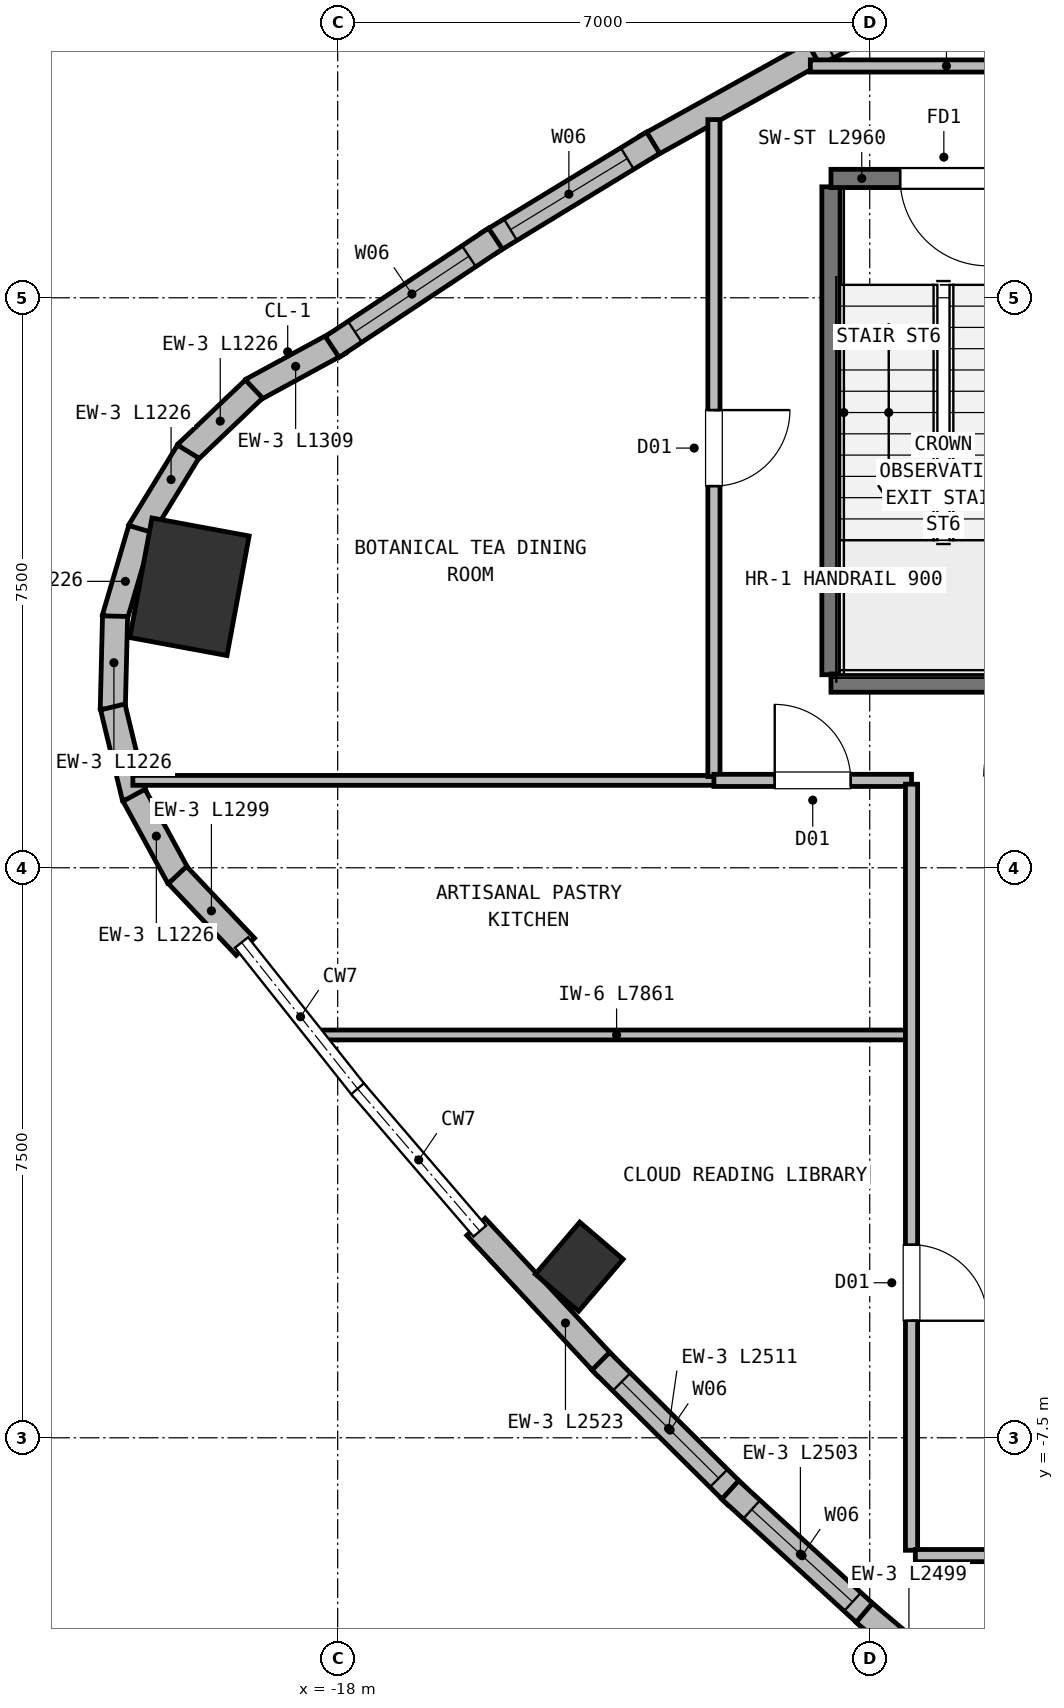
"""IFC4 building model, lengths in metres.
Left out: names, types, materials, properties, quantities, classifications, styles, units other than length and angle.
Written with IfcOpenShell. Run it as: python <this file> out.ifc"""

import sys

from ifc_helpers import new_model, si_unit, direction, frame, frame_2d, origin, origin_2d, place, context, subcontext, project, spatial, rectangle, extrude, element, fill, save


model = new_model("IFC4")
c1 = context("Model", 3, precision=1e-05, world=origin(), true_north=direction((0.0, 1.0)))
c2 = subcontext(c1, "Body", "Model", "MODEL_VIEW")
j1 = project(units=[si_unit("LENGTHUNIT", "METRE"), si_unit("PLANEANGLEUNIT", "RADIAN")], contexts=[c1])
p1 = place(None, origin())
s1 = spatial("IfcSite", under=j1, at=p1, CompositionType="ELEMENT")
p2 = place(p1, origin())
s2 = spatial("IfcBuilding", under=s1, at=p2, CompositionType="ELEMENT")
p3 = place(p2, frame((0.0, 0.0, 290.4)))
s3 = spatial("IfcBuildingStorey", under=s2, at=p3, CompositionType="ELEMENT", Elevation=290.4)
p4 = place(p3, frame((-19.95, 3.698, 0.0), z_axis=(0.0, 0.0, 1.0), x_axis=(-0.983254907564, 0.182235525492, 0.0)))
e1 = element("IfcColumn", 1, at=p4, inside=s3, PredefinedType="COLUMN", context=c2, shape_type="SweptSolid", body=[
    extrude(rectangle(XDim=1.3, YDim=1.6, at=origin_2d()), origin(), (0.0, 0.0, 1.0), 4.4),
])
p5 = place(p3, frame((-14.823, -5.249, 0.0), z_axis=(0.0, 0.0, 1.0), x_axis=(-0.7604059656, 0.64944804833, 0.0)))
e2 = element("IfcColumn", 2, at=p5, inside=s3, PredefinedType="COLUMN", context=c2, shape_type="SweptSolid", body=[
    extrude(rectangle(XDim=0.75, YDim=0.9, at=origin_2d()), origin(), (0.0, 0.0, 1.0), 4.4),
])
p6 = place(p3, frame((-19.128, 6.284, 0.0), z_axis=(0.0, 0.0, 1.0), x_axis=(0.878173375728, 0.478342473719, 0.0)))
e3 = element("IfcWall", 3, at=p6, inside=s3, PredefinedType="SOLIDWALL", context=c2, shape_type="SweptSolid", body=[
    extrude(rectangle(XDim=1.309, YDim=0.33, at=frame_2d((0.655, 0.0))), origin(), (0.0, 0.0, 1.0), 4.13),
])
for number, where, z_axis, x_axis in (
    (4, (-19.989, 5.454, 0.0), (0.0, 0.0, 1.0), (0.724, 0.69, 0.0)),
    (5, (-20.606, 4.43, 0.0), (0.0, 0.0, 1.0), (0.521, 0.853, 0.0)),
    (6, (-20.937, 3.281, 0.0), (0.0, 0.0, 1.0), (0.282, 0.959, 0.0)),
    (7, (-20.959, 2.085, 0.0), (0.0, 0.0, 1.0), (0.025, 1.0, 0.0)),
    (8, (-20.671, 0.924, 0.0), (0.0, 0.0, 1.0), (-0.235, 0.972, 0.0)),
):
    element("IfcWall", number, at=place(p3, frame(where, z_axis=z_axis, x_axis=x_axis)), inside=s3, PredefinedType="SOLIDWALL", context=c2, shape_type="SweptSolid", body=[
        extrude(rectangle(XDim=1.226, YDim=0.33, at=frame_2d((0.613, 0.0))), origin(), (0.0, 0.0, 1.0), 4.13),
    ])
p7 = place(p3, frame((-20.093, -0.122, 0.0), z_axis=(0.0, 0.0, 1.0), x_axis=(-0.478321862725, 0.878184602256, 0.0)))
e9 = element("IfcWall", 9, at=p7, inside=s3, PredefinedType="SOLIDWALL", context=c2, shape_type="SweptSolid", body=[
    extrude(rectangle(XDim=1.226, YDim=0.33, at=frame_2d((0.613, 0.0))), origin(), (0.0, 0.0, 1.0), 4.13),
])
p8 = place(p3, frame((-19.215, -1.039, 0.0), z_axis=(0.0, 0.0, 1.0), x_axis=(-0.687489239636, 0.726194564414, 0.0)))
e10 = element("IfcWall", 10, at=p8, inside=s3, PredefinedType="SOLIDWALL", context=c2, shape_type="SweptSolid", body=[
    extrude(rectangle(XDim=1.299, YDim=0.33, at=frame_2d((0.65, 0.0))), origin(), (0.0, 0.0, 1.0), 4.13),
])
p9 = place(p3, frame((-14.462, -6.572, 0.0), z_axis=(0.0, 0.0, 1.0), x_axis=(-0.681100323402, 0.732190104728, 0.0)))
e11 = element("IfcWall", 11, at=p9, inside=s3, PredefinedType="SOLIDWALL", context=c2, shape_type="SweptSolid", body=[
    extrude(rectangle(XDim=2.523, YDim=0.33, at=frame_2d((1.262, 0.0))), origin(), (0.0, 0.0, 1.0), 4.13),
])
p10 = place(p3, frame((-12.756, -8.262, 0.0), z_axis=(0.0, 0.0, 1.0), x_axis=(-0.709823779942, 0.704379302243, 0.0)))
e12 = element("IfcWall", 12, at=p10, inside=s3, PredefinedType="SOLIDWALL", context=c2, shape_type="SweptSolid", body=[
    extrude(rectangle(XDim=2.511, YDim=0.33, at=frame_2d((1.256, 0.0))), origin(), (0.0, 0.0, 1.0), 4.13),
])
p11 = place(p10, frame((0.326, 0.0, 0.72)))
e13 = element("IfcOpeningElement", 13, at=p11, cuts=e12, PredefinedType="OPENING", context=c2, shape_type="SweptSolid", body=[
    extrude(rectangle(XDim=1.8, YDim=2.25, at=frame_2d((0.9, 1.125))), frame((0.0, 0.175, 0.0), z_axis=(0.0, -1.0, 0.0), x_axis=(1.0, 0.0, 0.0)), (0.0, 0.0, 1.0), 0.35),
])
p12 = place(p3, frame((-10.989, -9.876, 0.0), z_axis=(0.0, 0.0, 1.0), x_axis=(-0.737627628948, 0.675207731748, 0.0)))
e14 = element("IfcWall", 14, at=p12, inside=s3, PredefinedType="SOLIDWALL", context=c2, shape_type="SweptSolid", body=[
    extrude(rectangle(XDim=2.503, YDim=0.33, at=frame_2d((1.251, 0.0))), origin(), (0.0, 0.0, 1.0), 4.13),
])
p13 = place(p12, frame((0.322, 0.0, 0.72)))
e15 = element("IfcOpeningElement", 15, at=p13, cuts=e14, PredefinedType="OPENING", context=c2, shape_type="SweptSolid", body=[
    extrude(rectangle(XDim=1.8, YDim=2.25, at=frame_2d((0.9, 1.125))), frame((0.0, 0.175, 0.0), z_axis=(0.0, -1.0, 0.0), x_axis=(1.0, 0.0, 0.0)), (0.0, 0.0, 1.0), 0.35),
])
p14 = place(p3, frame((-9.161, -11.415, 0.0), z_axis=(0.0, 0.0, 1.0), x_axis=(-0.764315556833, 0.644842406781, 0.0)))
e16 = element("IfcWall", 16, at=p14, inside=s3, PredefinedType="SOLIDWALL", context=c2, shape_type="SweptSolid", body=[
    extrude(rectangle(XDim=2.499, YDim=0.33, at=frame_2d((1.25, 0.0))), origin(), (0.0, 0.0, 1.0), 4.13),
])
p15 = place(p3, frame((-11.836, 10.659, 0.0), z_axis=(0.0, 0.0, 1.0), x_axis=(0.892552621867, 0.450943252747, 0.0)))
e17 = element("IfcWall", 17, at=p15, inside=s3, PredefinedType="SOLIDWALL", context=c2, shape_type="SweptSolid", body=[
    extrude(rectangle(XDim=2.511, YDim=0.33, at=frame_2d((1.255, 0.0))), origin(), (0.0, 0.0, 1.0), 4.13),
])
p16 = place(p15, frame((0.325, 0.0, 0.72)))
e18 = element("IfcOpeningElement", 18, at=p16, cuts=e17, PredefinedType="OPENING", context=c2, shape_type="SweptSolid", body=[
    extrude(rectangle(XDim=1.8, YDim=2.25, at=frame_2d((0.9, 1.125))), frame((0.0, 0.175, 0.0), z_axis=(0.0, -1.0, 0.0), x_axis=(1.0, 0.0, 0.0)), (0.0, 0.0, 1.0), 0.35),
])
p17 = place(p3, frame((-13.944, 9.485, 0.0), z_axis=(0.0, 0.0, 1.0), x_axis=(0.873960918974, 0.485996205856, 0.0)))
e19 = element("IfcWall", 19, at=p17, inside=s3, PredefinedType="SOLIDWALL", context=c2, shape_type="SweptSolid", body=[
    extrude(rectangle(XDim=2.523, YDim=0.33, at=frame_2d((1.261, 0.0))), origin(), (0.0, 0.0, 1.0), 4.13),
])
p18 = place(p3, frame((-16.017, 8.219, 0.0), z_axis=(0.0, 0.0, 1.0), x_axis=(0.854010909552, 0.520255097395, 0.0)))
e20 = element("IfcWall", 20, at=p18, inside=s3, PredefinedType="SOLIDWALL", context=c2, shape_type="SweptSolid", body=[
    extrude(rectangle(XDim=2.538, YDim=0.33, at=frame_2d((1.269, 0.0))), origin(), (0.0, 0.0, 1.0), 4.13),
])
p19 = place(p18, frame((0.339, 0.0, 0.72)))
e21 = element("IfcOpeningElement", 21, at=p19, cuts=e20, PredefinedType="OPENING", context=c2, shape_type="SweptSolid", body=[
    extrude(rectangle(XDim=1.8, YDim=2.25, at=frame_2d((0.9, 1.125))), frame((0.0, 0.175, 0.0), z_axis=(0.0, -1.0, 0.0), x_axis=(1.0, 0.0, 0.0)), (0.0, 0.0, 1.0), 0.35),
])
p20 = place(p3, frame((-18.073, 6.854, 0.0), z_axis=(0.0, 0.0, 1.0), x_axis=(0.833460819708, 0.552578557322, 0.0)))
e22 = element("IfcWall", 22, at=p20, inside=s3, PredefinedType="SOLIDWALL", context=c2, shape_type="SweptSolid", body=[
    extrude(rectangle(XDim=2.578, YDim=0.33, at=frame_2d((1.289, 0.0))), origin(), (0.0, 0.0, 1.0), 4.13),
])
p21 = place(p20, frame((0.359, 0.0, 0.72)))
e23 = element("IfcOpeningElement", 23, at=p21, cuts=e22, PredefinedType="OPENING", context=c2, shape_type="SweptSolid", body=[
    extrude(rectangle(XDim=1.8, YDim=2.25, at=frame_2d((0.9, 1.125))), frame((0.0, 0.175, 0.0), z_axis=(0.0, -1.0, 0.0), x_axis=(1.0, 0.0, 0.0)), (0.0, 0.0, 1.0), 0.35),
])
p22 = place(p3, frame((-11.51, 2.54, 0.0), z_axis=(0.0, 0.0, 1.0), x_axis=(0.0, 1.0, 0.0)))
e24 = element("IfcWall", 24, at=p22, inside=s3, PredefinedType="SHEAR", context=c2, shape_type="SweptSolid", body=[
    extrude(rectangle(XDim=6.42, YDim=0.24, at=frame_2d((3.21, 0.0))), origin(), (0.0, 0.0, 1.0), 4.13),
])
p23 = place(p3, frame((-11.51, 2.43, 0.0), z_axis=(0.0, 0.0, 1.0), x_axis=(1.0, 0.0, 0.0)))
e25 = element("IfcWall", 25, at=p23, inside=s3, PredefinedType="SHEAR", context=c2, shape_type="SweptSolid", body=[
    extrude(rectangle(XDim=2.96, YDim=0.24, at=frame_2d((1.48, 0.0))), origin(), (0.0, 0.0, 1.0), 4.13),
])
p24 = place(p3, frame((-8.55, 9.07, 0.0), z_axis=(0.0, 0.0, 1.0), x_axis=(-1.0, 0.0, 0.0)))
e26 = element("IfcWall", 26, at=p24, inside=s3, PredefinedType="SHEAR", context=c2, shape_type="SweptSolid", body=[
    extrude(rectangle(XDim=2.96, YDim=0.24, at=frame_2d((1.48, 0.0))), origin(), (0.0, 0.0, 1.0), 4.13),
])
p25 = place(p24, frame((0.9, 0.0, 0.0)))
e27 = element("IfcOpeningElement", 27, at=p25, cuts=e26, PredefinedType="OPENING", context=c2, shape_type="SweptSolid", body=[
    extrude(rectangle(XDim=1.15, YDim=2.15, at=frame_2d((0.575, 1.075))), frame((0.0, 0.13, 0.0), z_axis=(0.0, -1.0, 0.0), x_axis=(1.0, 0.0, 0.0)), (0.0, 0.0, 1.0), 0.26),
])
p26 = place(p3, frame((-18.261, -2.2, 0.0), z_axis=(0.0, 0.0, 1.0), x_axis=(1.0, 0.0, 0.0)))
e28 = element("IfcWall", 28, at=p26, inside=s3, PredefinedType="PARTITIONING", context=c2, shape_type="SweptSolid", body=[
    extrude(rectangle(XDim=7.861, YDim=0.13, at=frame_2d((3.931, 0.0))), origin(), (0.0, 0.0, 1.0), 4.13),
])
p27 = place(p3, frame((-20.695, 1.15, 0.0), z_axis=(0.0, 0.0, 1.0), x_axis=(1.0, 0.0, 0.0)))
e29 = element("IfcWall", 29, at=p27, inside=s3, PredefinedType="PARTITIONING", context=c2, shape_type="SweptSolid", body=[
    extrude(rectangle(XDim=7.695, YDim=0.13, at=frame_2d((3.847, 0.0))), origin(), (0.0, 0.0, 1.0), 4.13),
])
p28 = place(p3, frame((-7.12, 10.55, 0.0), z_axis=(0.0, 0.0, 1.0), x_axis=(-1.0, 0.0, 0.0)))
e30 = element("IfcWall", 30, at=p28, inside=s3, PredefinedType="PARTITIONING", context=c2, shape_type="SweptSolid", body=[
    extrude(rectangle(XDim=4.661, YDim=0.16, at=frame_2d((2.331, 0.0))), origin(), (0.0, 0.0, 1.0), 4.13),
])
p29 = place(p3, frame((-13.05, 9.844, 0.0), z_axis=(0.0, 0.0, 1.0), x_axis=(0.0, -1.0, 0.0)))
e31 = element("IfcWall", 31, at=p29, inside=s3, PredefinedType="PARTITIONING", context=c2, shape_type="SweptSolid", body=[
    extrude(rectangle(XDim=8.645, YDim=0.16, at=frame_2d((4.322, 0.0))), origin(), (0.0, 0.0, 1.0), 4.13),
])
p30 = place(p29, frame((3.822, 0.0, 0.0)))
e32 = element("IfcOpeningElement", 32, at=p30, cuts=e31, PredefinedType="OPENING", context=c2, shape_type="SweptSolid", body=[
    extrude(rectangle(XDim=1.0, YDim=2.15, at=frame_2d((0.5, 1.075))), frame((0.0, 0.09, 0.0), z_axis=(0.0, -1.0, 0.0), x_axis=(1.0, 0.0, 0.0)), (0.0, 0.0, 1.0), 0.18),
])
p31 = place(p3, frame((-13.05, 1.15, 0.0), z_axis=(0.0, 0.0, 1.0), x_axis=(1.0, 0.0, 0.0)))
e33 = element("IfcWall", 33, at=p31, inside=s3, PredefinedType="PARTITIONING", context=c2, shape_type="SweptSolid", body=[
    extrude(rectangle(XDim=2.6, YDim=0.16, at=frame_2d((1.3, 0.0))), origin(), (0.0, 0.0, 1.0), 3.71),
])
p32 = place(p31, frame((0.8, 0.0, 0.0)))
e34 = element("IfcOpeningElement", 34, at=p32, cuts=e33, PredefinedType="OPENING", context=c2, shape_type="SweptSolid", body=[
    extrude(rectangle(XDim=1.0, YDim=2.15, at=frame_2d((0.5, 1.075))), frame((0.0, 0.09, 0.0), z_axis=(0.0, -1.0, 0.0), x_axis=(1.0, 0.0, 0.0)), (0.0, 0.0, 1.0), 0.18),
])
p33 = place(p3, frame((-10.45, 1.1, 0.0), z_axis=(0.0, 0.0, 1.0), x_axis=(0.0, -1.0, 0.0)))
e35 = element("IfcWall", 35, at=p33, inside=s3, PredefinedType="PARTITIONING", context=c2, shape_type="SweptSolid", body=[
    extrude(rectangle(XDim=10.08, YDim=0.16, at=frame_2d((5.04, 0.0))), origin(), (0.0, 0.0, 1.0), 4.13),
])
p34 = place(p33, frame((6.06, 0.0, 0.0)))
e36 = element("IfcOpeningElement", 36, at=p34, cuts=e35, PredefinedType="OPENING", context=c2, shape_type="SweptSolid", body=[
    extrude(rectangle(XDim=1.0, YDim=2.15, at=frame_2d((0.5, 1.075))), frame((0.0, 0.09, 0.0), z_axis=(0.0, -1.0, 0.0), x_axis=(1.0, 0.0, 0.0)), (0.0, 0.0, 1.0), 0.18),
])
p35 = place(p3, frame((-10.4, -9.05, 0.0), z_axis=(0.0, 0.0, 1.0), x_axis=(1.0, 0.0, 0.0)))
e37 = element("IfcWall", 37, at=p35, inside=s3, PredefinedType="PARTITIONING", context=c2, shape_type="SweptSolid", body=[
    extrude(rectangle(XDim=19.1, YDim=0.16, at=frame_2d((9.55, 0.0))), origin(), (0.0, 0.0, 1.0), 4.13),
])
p36 = place(p35, frame((4.23, 0.0, 0.0)))
e38 = element("IfcOpeningElement", 38, at=p36, cuts=e37, PredefinedType="OPENING", context=c2, shape_type="SweptSolid", body=[
    extrude(rectangle(XDim=1.0, YDim=2.15, at=frame_2d((0.5, 1.075))), frame((0.0, 0.09, 0.0), z_axis=(0.0, -1.0, 0.0), x_axis=(1.0, 0.0, 0.0)), (0.0, 0.0, 1.0), 0.18),
])
p37 = place(p35, frame((11.9, 0.0, 0.0)))
e39 = element("IfcOpeningElement", 39, at=p37, cuts=e37, PredefinedType="OPENING", context=c2, shape_type="SweptSolid", body=[
    extrude(rectangle(XDim=1.0, YDim=2.15, at=frame_2d((0.5, 1.075))), frame((0.0, 0.09, 0.0), z_axis=(0.0, -1.0, 0.0), x_axis=(1.0, 0.0, 0.0)), (0.0, 0.0, 1.0), 0.18),
])
p38 = place(p35, frame((16.745, 0.0, 0.0)))
e40 = element("IfcOpeningElement", 40, at=p38, cuts=e37, PredefinedType="OPENING", context=c2, shape_type="SweptSolid", body=[
    extrude(rectangle(XDim=0.95, YDim=2.1, at=frame_2d((0.475, 1.05))), frame((0.0, 0.09, 0.0), z_axis=(0.0, -1.0, 0.0), x_axis=(1.0, 0.0, 0.0)), (0.0, 0.0, 1.0), 0.18),
])
p39 = place(p11, origin())
e41 = element("IfcWindow", 41, at=p39, inside=s3, PartitioningType="SINGLE_PANEL", PredefinedType="WINDOW", context=c2, shape_type="SweptSolid", body=[
    extrude(rectangle(XDim=1.8, YDim=2.25, at=frame_2d((0.9, 1.125))), frame((0.0, 0.03, 0.0), z_axis=(0.0, -1.0, 0.0), x_axis=(1.0, 0.0, 0.0)), (0.0, 0.0, 1.0), 0.06),
])
fill(e13, e41)
p40 = place(p13, origin())
e42 = element("IfcWindow", 42, at=p40, inside=s3, PartitioningType="SINGLE_PANEL", PredefinedType="WINDOW", context=c2, shape_type="SweptSolid", body=[
    extrude(rectangle(XDim=1.8, YDim=2.25, at=frame_2d((0.9, 1.125))), frame((0.0, 0.03, 0.0), z_axis=(0.0, -1.0, 0.0), x_axis=(1.0, 0.0, 0.0)), (0.0, 0.0, 1.0), 0.06),
])
fill(e15, e42)
p41 = place(p19, origin())
e43 = element("IfcWindow", 43, at=p41, inside=s3, PartitioningType="SINGLE_PANEL", PredefinedType="WINDOW", context=c2, shape_type="SweptSolid", body=[
    extrude(rectangle(XDim=1.8, YDim=2.25, at=frame_2d((0.9, 1.125))), frame((0.0, 0.03, 0.0), z_axis=(0.0, -1.0, 0.0), x_axis=(1.0, 0.0, 0.0)), (0.0, 0.0, 1.0), 0.06),
])
fill(e21, e43)
p42 = place(p21, origin())
e44 = element("IfcWindow", 44, at=p42, inside=s3, PartitioningType="SINGLE_PANEL", PredefinedType="WINDOW", context=c2, shape_type="SweptSolid", body=[
    extrude(rectangle(XDim=1.8, YDim=2.25, at=frame_2d((0.9, 1.125))), frame((0.0, 0.03, 0.0), z_axis=(0.0, -1.0, 0.0), x_axis=(1.0, 0.0, 0.0)), (0.0, 0.0, 1.0), 0.06),
])
fill(e23, e44)
p43 = place(p25, origin())
e45 = element("IfcDoor", 45, at=p43, inside=s3, OperationType="SINGLE_SWING_LEFT", PredefinedType="DOOR", context=c2, shape_type="SweptSolid", body=[
    extrude(rectangle(XDim=1.15, YDim=2.15, at=frame_2d((0.575, 1.075))), frame((0.0, 0.025, 0.0), z_axis=(0.0, -1.0, 0.0), x_axis=(1.0, 0.0, 0.0)), (0.0, 0.0, 1.0), 0.05),
])
fill(e27, e45)
p44 = place(p32, origin())
e46 = element("IfcDoor", 46, at=p44, inside=s3, OperationType="SINGLE_SWING_LEFT", PredefinedType="DOOR", context=c2, shape_type="SweptSolid", body=[
    extrude(rectangle(XDim=1.0, YDim=2.15, at=frame_2d((0.5, 1.075))), frame((0.0, 0.025, 0.0), z_axis=(0.0, -1.0, 0.0), x_axis=(1.0, 0.0, 0.0)), (0.0, 0.0, 1.0), 0.05),
])
fill(e34, e46)
p45 = place(p34, origin())
e47 = element("IfcDoor", 47, at=p45, inside=s3, OperationType="SINGLE_SWING_RIGHT", PredefinedType="DOOR", context=c2, shape_type="SweptSolid", body=[
    extrude(rectangle(XDim=1.0, YDim=2.15, at=frame_2d((0.5, 1.075))), frame((0.0, 0.025, 0.0), z_axis=(0.0, -1.0, 0.0), x_axis=(1.0, 0.0, 0.0)), (0.0, 0.0, 1.0), 0.05),
])
fill(e36, e47)
p46 = place(p30, origin())
e48 = element("IfcDoor", 48, at=p46, inside=s3, OperationType="SINGLE_SWING_LEFT", PredefinedType="DOOR", context=c2, shape_type="SweptSolid", body=[
    extrude(rectangle(XDim=1.0, YDim=2.15, at=frame_2d((0.5, 1.075))), frame((0.0, 0.025, 0.0), z_axis=(0.0, -1.0, 0.0), x_axis=(1.0, 0.0, 0.0)), (0.0, 0.0, 1.0), 0.05),
])
fill(e32, e48)
save(model, sys.argv[1])
